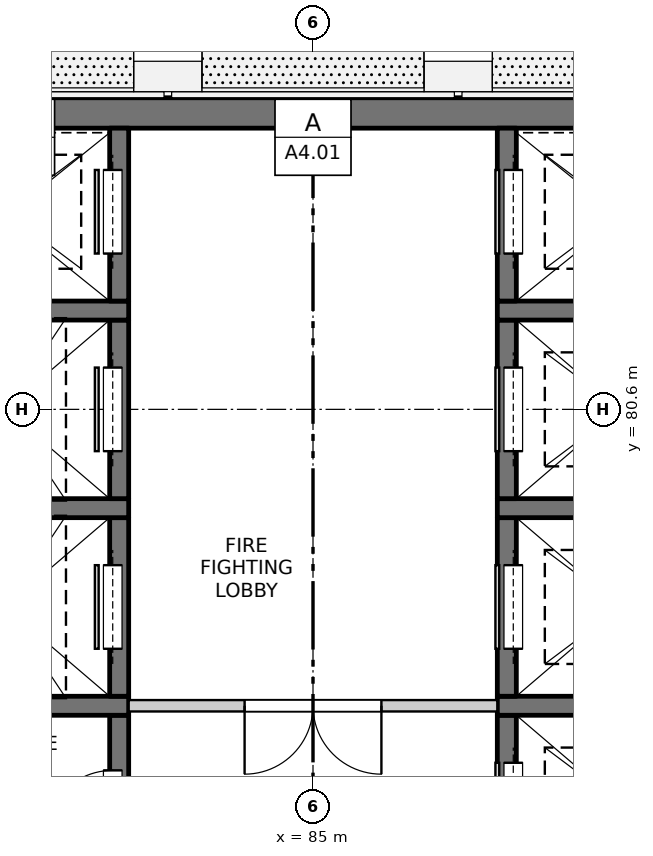
"""IFC4 building model, lengths in metres.
Left out: names, types, materials, properties, quantities, classifications, styles, units other than length and angle.
Written with IfcOpenShell. Run it as: python <this file> out.ifc"""

import sys

from ifc_helpers import new_model, si_unit, direction, frame, frame_2d, origin, place, context, subcontext, project, spatial, rectangle, extrude, element, fill, save


model = new_model("IFC4")
c1 = context("Model", 3, precision=1e-05, world=origin(), true_north=direction((0.0, 1.0)))
c2 = subcontext(c1, "Body", "Model", "MODEL_VIEW")
j1 = project(units=[si_unit("LENGTHUNIT", "METRE"), si_unit("PLANEANGLEUNIT", "RADIAN")], contexts=[c1])
p1 = place(None, origin())
s1 = spatial("IfcSite", under=j1, at=p1, CompositionType="ELEMENT")
p2 = place(p1, origin())
s2 = spatial("IfcBuilding", under=s1, at=p2, CompositionType="ELEMENT")
p3 = place(p2, frame((0.0, 0.0, 263.0)))
s3 = spatial("IfcBuildingStorey", under=s2, at=p3, CompositionType="ELEMENT", Elevation=263.0)
p4 = place(p3, frame((75.45, 84.5, -0.25), z_axis=(0.0, 0.0, 1.0), x_axis=(1.0, 0.0, 0.0)))
e1 = element("IfcWall", 1, at=p4, inside=s3, PredefinedType="SOLIDWALL", context=c2, shape_type="SweptSolid", body=[
    extrude(rectangle(XDim=19.1, YDim=0.4, at=frame_2d((9.55, 0.0))), origin(), (0.0, 0.0, 1.0), 3.35),
])
p5 = place(p3, frame((82.45, 74.225, -0.25), z_axis=(0.0, 0.0, 1.0), x_axis=(0.0, 1.0, 0.0)))
e2 = element("IfcWall", 2, at=p5, inside=s3, PredefinedType="SOLIDWALL", context=c2, shape_type="SweptSolid", body=[
    extrude(rectangle(XDim=2.35, YDim=0.25, at=frame_2d((1.175, 0.0))), origin(), (0.0, 0.0, 1.0), 3.35),
])
p6 = place(p5, frame((0.725, 0.0, 0.25)))
e3 = element("IfcOpeningElement", 3, at=p6, cuts=e2, PredefinedType="OPENING", context=c2, shape_type="SweptSolid", body=[
    extrude(rectangle(XDim=0.9, YDim=2.1, at=frame_2d((0.45, 1.05))), frame((0.0, 0.135, 0.0), z_axis=(0.0, -1.0, 0.0), x_axis=(1.0, 0.0, 0.0)), (0.0, 0.0, 1.0), 0.27),
])
p7 = place(p3, frame((79.575, 76.7, -0.25), z_axis=(0.0, 0.0, 1.0), x_axis=(1.0, 0.0, 0.0)))
e4 = element("IfcWall", 4, at=p7, inside=s3, PredefinedType="SOLIDWALL", context=c2, shape_type="SweptSolid", body=[
    extrude(rectangle(XDim=3.0, YDim=0.25, at=frame_2d((1.5, 0.0))), origin(), (0.0, 0.0, 1.0), 3.35),
])
p8 = place(p3, frame((82.45, 76.825, -0.25), z_axis=(0.0, 0.0, 1.0), x_axis=(0.0, 1.0, 0.0)))
e5 = element("IfcWall", 5, at=p8, inside=s3, PredefinedType="SOLIDWALL", context=c2, shape_type="SweptSolid", body=[
    extrude(rectangle(XDim=2.35, YDim=0.25, at=frame_2d((1.175, 0.0))), origin(), (0.0, 0.0, 1.0), 3.35),
])
p9 = place(p8, frame((0.625, 0.0, 0.25)))
e6 = element("IfcOpeningElement", 6, at=p9, cuts=e5, PredefinedType="OPENING", context=c2, shape_type="SweptSolid", body=[
    extrude(rectangle(XDim=1.1, YDim=2.1, at=frame_2d((0.55, 1.05))), frame((0.0, 0.135, 0.0), z_axis=(0.0, -1.0, 0.0), x_axis=(1.0, 0.0, 0.0)), (0.0, 0.0, 1.0), 0.27),
])
p10 = place(p3, frame((79.575, 79.3, -0.25), z_axis=(0.0, 0.0, 1.0), x_axis=(1.0, 0.0, 0.0)))
e7 = element("IfcWall", 7, at=p10, inside=s3, PredefinedType="SOLIDWALL", context=c2, shape_type="SweptSolid", body=[
    extrude(rectangle(XDim=3.0, YDim=0.25, at=frame_2d((1.5, 0.0))), origin(), (0.0, 0.0, 1.0), 3.35),
])
p11 = place(p3, frame((82.45, 79.425, -0.25), z_axis=(0.0, 0.0, 1.0), x_axis=(0.0, 1.0, 0.0)))
e8 = element("IfcWall", 8, at=p11, inside=s3, PredefinedType="SOLIDWALL", context=c2, shape_type="SweptSolid", body=[
    extrude(rectangle(XDim=2.35, YDim=0.25, at=frame_2d((1.175, 0.0))), origin(), (0.0, 0.0, 1.0), 3.35),
])
p12 = place(p11, frame((0.625, 0.0, 0.25)))
e9 = element("IfcOpeningElement", 9, at=p12, cuts=e8, PredefinedType="OPENING", context=c2, shape_type="SweptSolid", body=[
    extrude(rectangle(XDim=1.1, YDim=2.1, at=frame_2d((0.55, 1.05))), frame((0.0, 0.135, 0.0), z_axis=(0.0, -1.0, 0.0), x_axis=(1.0, 0.0, 0.0)), (0.0, 0.0, 1.0), 0.27),
])
p13 = place(p3, frame((79.575, 81.9, -0.25), z_axis=(0.0, 0.0, 1.0), x_axis=(1.0, 0.0, 0.0)))
e10 = element("IfcWall", 10, at=p13, inside=s3, PredefinedType="SOLIDWALL", context=c2, shape_type="SweptSolid", body=[
    extrude(rectangle(XDim=3.0, YDim=0.25, at=frame_2d((1.5, 0.0))), origin(), (0.0, 0.0, 1.0), 3.35),
])
p14 = place(p3, frame((82.45, 82.025, -0.25), z_axis=(0.0, 0.0, 1.0), x_axis=(0.0, 1.0, 0.0)))
e11 = element("IfcWall", 11, at=p14, inside=s3, PredefinedType="SOLIDWALL", context=c2, shape_type="SweptSolid", body=[
    extrude(rectangle(XDim=2.275, YDim=0.25, at=frame_2d((1.138, 0.0))), origin(), (0.0, 0.0, 1.0), 3.35),
])
p15 = place(p14, frame((0.625, 0.0, 0.25)))
e12 = element("IfcOpeningElement", 12, at=p15, cuts=e11, PredefinedType="OPENING", context=c2, shape_type="SweptSolid", body=[
    extrude(rectangle(XDim=1.1, YDim=2.1, at=frame_2d((0.55, 1.05))), frame((0.0, 0.135, 0.0), z_axis=(0.0, -1.0, 0.0), x_axis=(1.0, 0.0, 0.0)), (0.0, 0.0, 1.0), 0.27),
])
p16 = place(p3, frame((87.55, 74.225, -0.25), z_axis=(0.0, 0.0, 1.0), x_axis=(0.0, 1.0, 0.0)))
e13 = element("IfcWall", 13, at=p16, inside=s3, PredefinedType="SOLIDWALL", context=c2, shape_type="SweptSolid", body=[
    extrude(rectangle(XDim=2.35, YDim=0.25, at=frame_2d((1.175, 0.0))), origin(), (0.0, 0.0, 1.0), 3.35),
])
p17 = place(p16, frame((0.625, 0.0, 0.25)))
e14 = element("IfcOpeningElement", 14, at=p17, cuts=e13, PredefinedType="OPENING", context=c2, shape_type="SweptSolid", body=[
    extrude(rectangle(XDim=1.1, YDim=2.1, at=frame_2d((0.55, 1.05))), frame((0.0, 0.135, 0.0), z_axis=(0.0, -1.0, 0.0), x_axis=(1.0, 0.0, 0.0)), (0.0, 0.0, 1.0), 0.27),
])
p18 = place(p3, frame((87.425, 76.7, -0.25), z_axis=(0.0, 0.0, 1.0), x_axis=(1.0, 0.0, 0.0)))
e15 = element("IfcWall", 15, at=p18, inside=s3, PredefinedType="SOLIDWALL", context=c2, shape_type="SweptSolid", body=[
    extrude(rectangle(XDim=3.0, YDim=0.25, at=frame_2d((1.5, 0.0))), origin(), (0.0, 0.0, 1.0), 3.35),
])
p19 = place(p3, frame((87.55, 76.825, -0.25), z_axis=(0.0, 0.0, 1.0), x_axis=(0.0, 1.0, 0.0)))
e16 = element("IfcWall", 16, at=p19, inside=s3, PredefinedType="SOLIDWALL", context=c2, shape_type="SweptSolid", body=[
    extrude(rectangle(XDim=2.35, YDim=0.25, at=frame_2d((1.175, 0.0))), origin(), (0.0, 0.0, 1.0), 3.35),
])
p20 = place(p19, frame((0.625, 0.0, 0.25)))
e17 = element("IfcOpeningElement", 17, at=p20, cuts=e16, PredefinedType="OPENING", context=c2, shape_type="SweptSolid", body=[
    extrude(rectangle(XDim=1.1, YDim=2.1, at=frame_2d((0.55, 1.05))), frame((0.0, 0.135, 0.0), z_axis=(0.0, -1.0, 0.0), x_axis=(1.0, 0.0, 0.0)), (0.0, 0.0, 1.0), 0.27),
])
p21 = place(p3, frame((87.425, 79.3, -0.25), z_axis=(0.0, 0.0, 1.0), x_axis=(1.0, 0.0, 0.0)))
e18 = element("IfcWall", 18, at=p21, inside=s3, PredefinedType="SOLIDWALL", context=c2, shape_type="SweptSolid", body=[
    extrude(rectangle(XDim=3.0, YDim=0.25, at=frame_2d((1.5, 0.0))), origin(), (0.0, 0.0, 1.0), 3.35),
])
p22 = place(p3, frame((87.55, 79.425, -0.25), z_axis=(0.0, 0.0, 1.0), x_axis=(0.0, 1.0, 0.0)))
e19 = element("IfcWall", 19, at=p22, inside=s3, PredefinedType="SOLIDWALL", context=c2, shape_type="SweptSolid", body=[
    extrude(rectangle(XDim=2.35, YDim=0.25, at=frame_2d((1.175, 0.0))), origin(), (0.0, 0.0, 1.0), 3.35),
])
p23 = place(p22, frame((0.625, 0.0, 0.25)))
e20 = element("IfcOpeningElement", 20, at=p23, cuts=e19, PredefinedType="OPENING", context=c2, shape_type="SweptSolid", body=[
    extrude(rectangle(XDim=1.1, YDim=2.1, at=frame_2d((0.55, 1.05))), frame((0.0, 0.135, 0.0), z_axis=(0.0, -1.0, 0.0), x_axis=(1.0, 0.0, 0.0)), (0.0, 0.0, 1.0), 0.27),
])
p24 = place(p3, frame((87.425, 81.9, -0.25), z_axis=(0.0, 0.0, 1.0), x_axis=(1.0, 0.0, 0.0)))
e21 = element("IfcWall", 21, at=p24, inside=s3, PredefinedType="SOLIDWALL", context=c2, shape_type="SweptSolid", body=[
    extrude(rectangle(XDim=3.0, YDim=0.25, at=frame_2d((1.5, 0.0))), origin(), (0.0, 0.0, 1.0), 3.35),
])
p25 = place(p3, frame((87.55, 82.025, -0.25), z_axis=(0.0, 0.0, 1.0), x_axis=(0.0, 1.0, 0.0)))
e22 = element("IfcWall", 22, at=p25, inside=s3, PredefinedType="SOLIDWALL", context=c2, shape_type="SweptSolid", body=[
    extrude(rectangle(XDim=2.275, YDim=0.25, at=frame_2d((1.138, 0.0))), origin(), (0.0, 0.0, 1.0), 3.35),
])
p26 = place(p25, frame((0.625, 0.0, 0.25)))
e23 = element("IfcOpeningElement", 23, at=p26, cuts=e22, PredefinedType="OPENING", context=c2, shape_type="SweptSolid", body=[
    extrude(rectangle(XDim=1.1, YDim=2.1, at=frame_2d((0.55, 1.05))), frame((0.0, 0.135, 0.0), z_axis=(0.0, -1.0, 0.0), x_axis=(1.0, 0.0, 0.0)), (0.0, 0.0, 1.0), 0.27),
])
p27 = place(p3, frame((82.575, 76.7, 0.0), z_axis=(0.0, 0.0, 1.0), x_axis=(1.0, 0.0, 0.0)))
e24 = element("IfcWall", 24, at=p27, inside=s3, PredefinedType="PARTITIONING", context=c2, shape_type="SweptSolid", body=[
    extrude(rectangle(XDim=4.85, YDim=0.15, at=frame_2d((2.425, 0.0))), origin(), (0.0, 0.0, 1.0), 3.1),
])
p28 = place(p27, frame((1.525, 0.0, 0.0)))
e25 = element("IfcOpeningElement", 25, at=p28, cuts=e24, PredefinedType="OPENING", context=c2, shape_type="SweptSolid", body=[
    extrude(rectangle(XDim=1.8, YDim=2.1, at=frame_2d((0.9, 1.05))), frame((0.0, 0.085, 0.0), z_axis=(0.0, -1.0, 0.0), x_axis=(1.0, 0.0, 0.0)), (0.0, 0.0, 1.0), 0.17),
])
p29 = place(p6, origin())
e26 = element("IfcDoor", 26, at=p29, inside=s3, OperationType="SINGLE_SWING_LEFT", PredefinedType="DOOR", context=c2, shape_type="SweptSolid", body=[
    extrude(rectangle(XDim=0.9, YDim=2.1, at=frame_2d((0.45, 1.05))), frame((0.0, 0.11, 0.0), z_axis=(0.0, -1.0, 0.0), x_axis=(1.0, 0.0, 0.0)), (0.0, 0.0, 1.0), 0.05),
])
fill(e3, e26)
p30 = place(p17, origin())
e27 = element("IfcDoor", 27, at=p30, inside=s3, OperationType="SLIDING_TO_LEFT", PredefinedType="DOOR", context=c2, shape_type="SweptSolid", body=[
    extrude(rectangle(XDim=1.1, YDim=2.1, at=frame_2d((0.55, 1.05))), frame((0.0, -0.06, 0.0), z_axis=(0.0, -1.0, 0.0), x_axis=(1.0, 0.0, 0.0)), (0.0, 0.0, 1.0), 0.05),
])
fill(e14, e27)
p31 = place(p28, origin())
e28 = element("IfcDoor", 28, at=p31, inside=s3, OperationType="DOUBLE_DOOR_SINGLE_SWING", PredefinedType="DOOR", context=c2, shape_type="SweptSolid", body=[
    extrude(rectangle(XDim=1.8, YDim=2.1, at=frame_2d((0.9, 1.05))), frame((0.0, 0.025, 0.0), z_axis=(0.0, -1.0, 0.0), x_axis=(1.0, 0.0, 0.0)), (0.0, 0.0, 1.0), 0.05),
])
fill(e25, e28)
p32 = place(p9, origin())
e29 = element("IfcDoor", 29, at=p32, inside=s3, OperationType="SLIDING_TO_LEFT", PredefinedType="DOOR", context=c2, shape_type="SweptSolid", body=[
    extrude(rectangle(XDim=1.1, YDim=2.1, at=frame_2d((0.55, 1.05))), frame((0.0, 0.11, 0.0), z_axis=(0.0, -1.0, 0.0), x_axis=(1.0, 0.0, 0.0)), (0.0, 0.0, 1.0), 0.05),
])
fill(e6, e29)
p33 = place(p20, origin())
e30 = element("IfcDoor", 30, at=p33, inside=s3, OperationType="SLIDING_TO_LEFT", PredefinedType="DOOR", context=c2, shape_type="SweptSolid", body=[
    extrude(rectangle(XDim=1.1, YDim=2.1, at=frame_2d((0.55, 1.05))), frame((0.0, -0.06, 0.0), z_axis=(0.0, -1.0, 0.0), x_axis=(1.0, 0.0, 0.0)), (0.0, 0.0, 1.0), 0.05),
])
fill(e17, e30)
p34 = place(p12, origin())
e31 = element("IfcDoor", 31, at=p34, inside=s3, OperationType="SLIDING_TO_LEFT", PredefinedType="DOOR", context=c2, shape_type="SweptSolid", body=[
    extrude(rectangle(XDim=1.1, YDim=2.1, at=frame_2d((0.55, 1.05))), frame((0.0, 0.11, 0.0), z_axis=(0.0, -1.0, 0.0), x_axis=(1.0, 0.0, 0.0)), (0.0, 0.0, 1.0), 0.05),
])
fill(e9, e31)
p35 = place(p23, origin())
e32 = element("IfcDoor", 32, at=p35, inside=s3, OperationType="SLIDING_TO_RIGHT", PredefinedType="DOOR", context=c2, shape_type="SweptSolid", body=[
    extrude(rectangle(XDim=1.1, YDim=2.1, at=frame_2d((0.55, 1.05))), frame((0.0, -0.06, 0.0), z_axis=(0.0, -1.0, 0.0), x_axis=(1.0, 0.0, 0.0)), (0.0, 0.0, 1.0), 0.05),
])
fill(e20, e32)
p36 = place(p15, origin())
e33 = element("IfcDoor", 33, at=p36, inside=s3, OperationType="SLIDING_TO_RIGHT", PredefinedType="DOOR", context=c2, shape_type="SweptSolid", body=[
    extrude(rectangle(XDim=1.1, YDim=2.1, at=frame_2d((0.55, 1.05))), frame((0.0, 0.11, 0.0), z_axis=(0.0, -1.0, 0.0), x_axis=(1.0, 0.0, 0.0)), (0.0, 0.0, 1.0), 0.05),
])
fill(e12, e33)
p37 = place(p26, origin())
e34 = element("IfcDoor", 34, at=p37, inside=s3, OperationType="SLIDING_TO_RIGHT", PredefinedType="DOOR", context=c2, shape_type="SweptSolid", body=[
    extrude(rectangle(XDim=1.1, YDim=2.1, at=frame_2d((0.55, 1.05))), frame((0.0, -0.06, 0.0), z_axis=(0.0, -1.0, 0.0), x_axis=(1.0, 0.0, 0.0)), (0.0, 0.0, 1.0), 0.05),
])
fill(e23, e34)
save(model, sys.argv[1])
